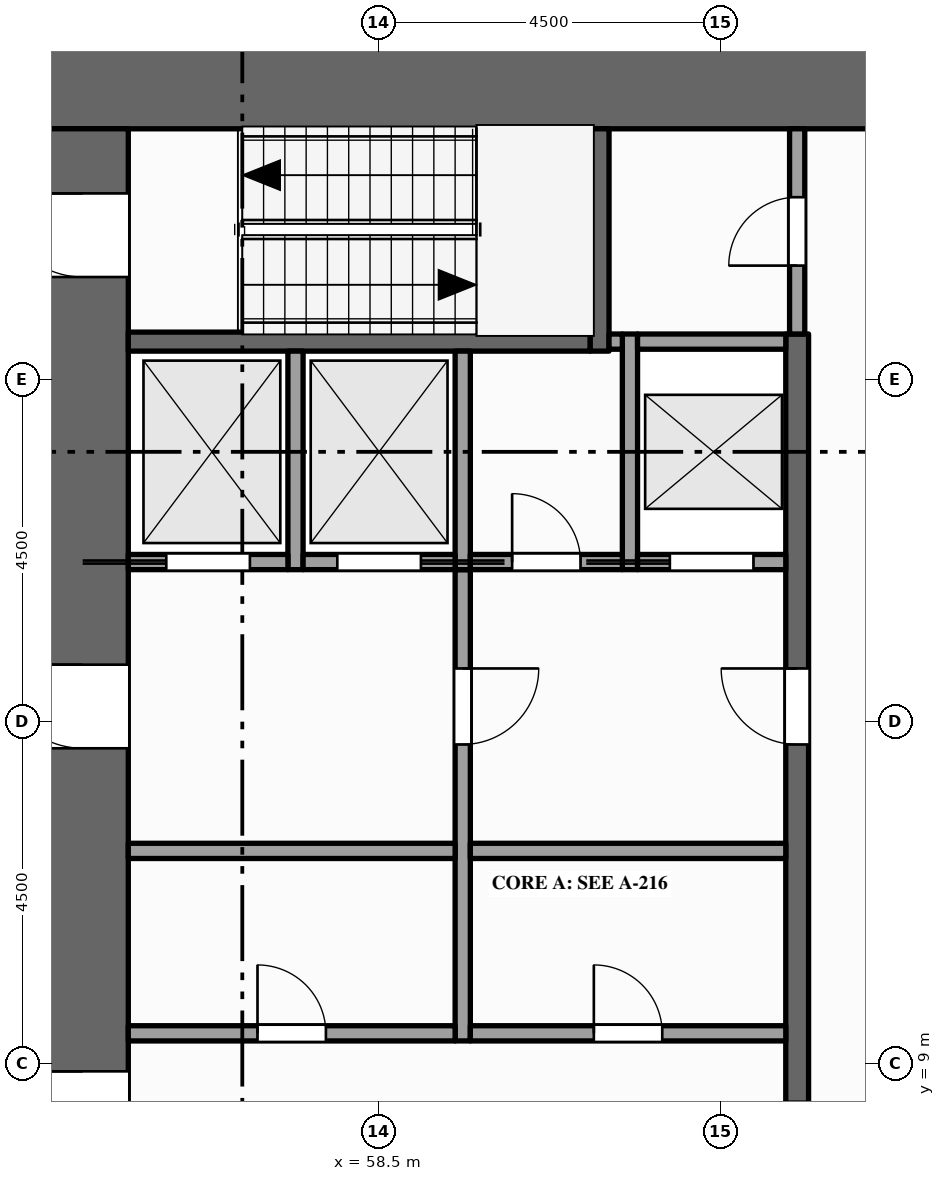
"""IFC4 building model, lengths in metres.
Left out: names, types, materials, properties, quantities, classifications, styles, units other than length and angle.
Written with IfcOpenShell. Run it as: python <this file> out.ifc"""

import sys

from ifc_helpers import new_model, si_unit, direction, frame, frame_2d, origin, place, context, subcontext, project, spatial, rectangle, extrude, element, fill, save


model = new_model("IFC4")
c1 = context("Model", 3, precision=1e-05, world=origin(), true_north=direction((0.0, 1.0)))
c2 = subcontext(c1, "Body", "Model", "MODEL_VIEW")
j1 = project(units=[si_unit("LENGTHUNIT", "METRE"), si_unit("PLANEANGLEUNIT", "RADIAN")], contexts=[c1])
p1 = place(None, origin())
s1 = spatial("IfcSite", under=j1, at=p1, CompositionType="ELEMENT")
p2 = place(p1, origin())
s2 = spatial("IfcBuilding", under=s1, at=p2, CompositionType="ELEMENT")
p3 = place(p2, frame((0.0, 0.0, 83.0)))
s3 = spatial("IfcBuildingStorey", under=s2, at=p3, CompositionType="ELEMENT", Elevation=83.0)
p4 = place(p3, frame((54.0, 21.9, -0.15), z_axis=(0.0, 0.0, 1.0), x_axis=(1.0, 0.0, 0.0)))
e1 = element("IfcWall", 1, at=p4, inside=s3, PredefinedType="SHEAR", context=c2, shape_type="SweptSolid", body=[
    extrude(rectangle(XDim=13.5, YDim=1.2, at=frame_2d((6.75, 0.0))), origin(), (0.0, 0.0, 1.0), 4.0),
])
p5 = place(p3, frame((54.6, 1.2, -0.15), z_axis=(0.0, 0.0, 1.0), x_axis=(0.0, 1.0, 0.0)))
e2 = element("IfcWall", 2, at=p5, inside=s3, PredefinedType="SHEAR", context=c2, shape_type="SweptSolid", body=[
    extrude(rectangle(XDim=20.1, YDim=1.2, at=frame_2d((10.05, 0.0))), origin(), (0.0, 0.0, 1.0), 4.0),
])
p6 = place(p5, frame((5.9, 0.0, 0.15)))
e3 = element("IfcOpeningElement", 3, at=p6, cuts=e2, PredefinedType="OPENING", context=c2, shape_type="SweptSolid", body=[
    extrude(rectangle(XDim=1.8, YDim=2.1, at=frame_2d((0.9, 1.05))), frame((0.0, 0.61, 0.0), z_axis=(0.0, -1.0, 0.0), x_axis=(1.0, 0.0, 0.0)), (0.0, 0.0, 1.0), 1.22),
])
p7 = place(p5, frame((11.95, 0.0, 0.15)))
e4 = element("IfcOpeningElement", 4, at=p7, cuts=e2, PredefinedType="OPENING", context=c2, shape_type="SweptSolid", body=[
    extrude(rectangle(XDim=1.1, YDim=2.1, at=frame_2d((0.55, 1.05))), frame((0.0, 0.61, 0.0), z_axis=(0.0, -1.0, 0.0), x_axis=(1.0, 0.0, 0.0)), (0.0, 0.0, 1.0), 1.22),
])
p8 = place(p5, frame((0.95, 0.0, 0.15)))
e5 = element("IfcOpeningElement", 5, at=p8, cuts=e2, PredefinedType="OPENING", context=c2, shape_type="SweptSolid", body=[
    extrude(rectangle(XDim=1.1, YDim=2.1, at=frame_2d((0.55, 1.05))), frame((0.0, 0.61, 0.0), z_axis=(0.0, -1.0, 0.0), x_axis=(1.0, 0.0, 0.0)), (0.0, 0.0, 1.0), 1.22),
])
p9 = place(p5, frame((18.15, 0.0, 0.15)))
e6 = element("IfcOpeningElement", 6, at=p9, cuts=e2, PredefinedType="OPENING", context=c2, shape_type="SweptSolid", body=[
    extrude(rectangle(XDim=1.1, YDim=2.1, at=frame_2d((0.55, 1.05))), frame((0.0, 0.61, 0.0), z_axis=(0.0, -1.0, 0.0), x_axis=(1.0, 0.0, 0.0)), (0.0, 0.0, 1.0), 1.22),
])
p10 = place(p3, frame((57.4, 15.5, 0.0), z_axis=(0.0, 0.0, 1.0), x_axis=(0.0, 1.0, 0.0)))
e7 = element("IfcWall", 7, at=p10, inside=s3, PredefinedType="SOLIDWALL", context=c2, shape_type="SweptSolid", body=[
    extrude(rectangle(XDim=2.875, YDim=0.2, at=frame_2d((1.438, 0.0))), origin(), (0.0, 0.0, 1.0), 3.85),
])
p11 = place(p3, frame((59.6, 9.3, 0.0), z_axis=(0.0, 0.0, 1.0), x_axis=(0.0, 1.0, 0.0)))
e8 = element("IfcWall", 8, at=p11, inside=s3, PredefinedType="PARTITIONING", context=c2, shape_type="SweptSolid", body=[
    extrude(rectangle(XDim=6.2, YDim=0.2, at=frame_2d((3.1, 0.0))), origin(), (0.0, 0.0, 1.0), 3.85),
])
p12 = place(p11, frame((3.9, 0.0, 0.0)))
e9 = element("IfcOpeningElement", 9, at=p12, cuts=e8, PredefinedType="OPENING", context=c2, shape_type="SweptSolid", body=[
    extrude(rectangle(XDim=1.0, YDim=2.1, at=frame_2d((0.5, 1.05))), frame((0.0, 0.11, 0.0), z_axis=(0.0, -1.0, 0.0), x_axis=(1.0, 0.0, 0.0)), (0.0, 0.0, 1.0), 0.22),
])
p13 = place(p3, frame((59.6, 15.5, 0.0), z_axis=(0.0, 0.0, 1.0), x_axis=(0.0, 1.0, 0.0)))
e10 = element("IfcWall", 10, at=p13, inside=s3, PredefinedType="SOLIDWALL", context=c2, shape_type="SweptSolid", body=[
    extrude(rectangle(XDim=2.875, YDim=0.2, at=frame_2d((1.438, 0.0))), origin(), (0.0, 0.0, 1.0), 3.85),
])
p14 = place(p3, frame((61.4, 18.375, 0.0), z_axis=(0.0, 0.0, 1.0), x_axis=(0.0, 1.0, 0.0)))
e11 = element("IfcWall", 11, at=p14, inside=s3, PredefinedType="SHEAR", context=c2, shape_type="SweptSolid", body=[
    extrude(rectangle(XDim=2.925, YDim=0.25, at=frame_2d((1.462, 0.0))), origin(), (0.0, 0.0, 1.0), 3.85),
])
p15 = place(p3, frame((61.8, 15.5, 0.0), z_axis=(0.0, 0.0, 1.0), x_axis=(0.0, 1.0, 0.0)))
e12 = element("IfcWall", 12, at=p15, inside=s3, PredefinedType="SOLIDWALL", context=c2, shape_type="SweptSolid", body=[
    extrude(rectangle(XDim=3.1, YDim=0.2, at=frame_2d((1.55, 0.0))), origin(), (0.0, 0.0, 1.0), 3.85),
])
p16 = place(p3, frame((64.0, 4.1, 0.0), z_axis=(0.0, 0.0, 1.0), x_axis=(0.0, 1.0, 0.0)))
e13 = element("IfcWall", 13, at=p16, inside=s3, PredefinedType="SHEAR", context=c2, shape_type="SweptSolid", body=[
    extrude(rectangle(XDim=14.5, YDim=0.3, at=frame_2d((7.25, 0.0))), origin(), (0.0, 0.0, 1.0), 3.85),
])
p17 = place(p16, frame((3.4, 0.0, 0.0)))
e14 = element("IfcOpeningElement", 14, at=p17, cuts=e13, PredefinedType="OPENING", context=c2, shape_type="SweptSolid", body=[
    extrude(rectangle(XDim=1.0, YDim=2.1, at=frame_2d((0.5, 1.05))), frame((0.0, 0.16, 0.0), z_axis=(0.0, -1.0, 0.0), x_axis=(1.0, 0.0, 0.0)), (0.0, 0.0, 1.0), 0.32),
])
p18 = place(p16, frame((9.1, 0.0, 0.0)))
e15 = element("IfcOpeningElement", 15, at=p18, cuts=e13, PredefinedType="OPENING", context=c2, shape_type="SweptSolid", body=[
    extrude(rectangle(XDim=1.0, YDim=2.1, at=frame_2d((0.5, 1.05))), frame((0.0, 0.16, 0.0), z_axis=(0.0, -1.0, 0.0), x_axis=(1.0, 0.0, 0.0)), (0.0, 0.0, 1.0), 0.32),
])
p19 = place(p3, frame((64.0, 18.6, 0.0), z_axis=(0.0, 0.0, 1.0), x_axis=(0.0, 1.0, 0.0)))
e16 = element("IfcWall", 16, at=p19, inside=s3, PredefinedType="PARTITIONING", context=c2, shape_type="SweptSolid", body=[
    extrude(rectangle(XDim=2.7, YDim=0.2, at=frame_2d((1.35, 0.0))), origin(), (0.0, 0.0, 1.0), 3.85),
])
p20 = place(p19, frame((0.9, 0.0, 0.0)))
e17 = element("IfcOpeningElement", 17, at=p20, cuts=e16, PredefinedType="OPENING", context=c2, shape_type="SweptSolid", body=[
    extrude(rectangle(XDim=0.9, YDim=2.1, at=frame_2d((0.45, 1.05))), frame((0.0, 0.11, 0.0), z_axis=(0.0, -1.0, 0.0), x_axis=(1.0, 0.0, 0.0)), (0.0, 0.0, 1.0), 0.22),
])
p21 = place(p3, frame((55.2, 9.4, 0.0), z_axis=(0.0, 0.0, 1.0), x_axis=(1.0, 0.0, 0.0)))
e18 = element("IfcWall", 18, at=p21, inside=s3, PredefinedType="PARTITIONING", context=c2, shape_type="SweptSolid", body=[
    extrude(rectangle(XDim=4.3, YDim=0.2, at=frame_2d((2.15, 0.0))), origin(), (0.0, 0.0, 1.0), 3.85),
])
p22 = place(p21, frame((1.7, 0.0, 0.0)))
e19 = element("IfcOpeningElement", 19, at=p22, cuts=e18, PredefinedType="OPENING", context=c2, shape_type="SweptSolid", body=[
    extrude(rectangle(XDim=0.9, YDim=2.1, at=frame_2d((0.45, 1.05))), frame((0.0, 0.11, 0.0), z_axis=(0.0, -1.0, 0.0), x_axis=(1.0, 0.0, 0.0)), (0.0, 0.0, 1.0), 0.22),
])
p23 = place(p3, frame((59.7, 9.4, 0.0), z_axis=(0.0, 0.0, 1.0), x_axis=(1.0, 0.0, 0.0)))
e20 = element("IfcWall", 20, at=p23, inside=s3, PredefinedType="PARTITIONING", context=c2, shape_type="SweptSolid", body=[
    extrude(rectangle(XDim=4.15, YDim=0.2, at=frame_2d((2.075, 0.0))), origin(), (0.0, 0.0, 1.0), 3.85),
])
p24 = place(p23, frame((1.625, 0.0, 0.0)))
e21 = element("IfcOpeningElement", 21, at=p24, cuts=e20, PredefinedType="OPENING", context=c2, shape_type="SweptSolid", body=[
    extrude(rectangle(XDim=0.9, YDim=2.1, at=frame_2d((0.45, 1.05))), frame((0.0, 0.11, 0.0), z_axis=(0.0, -1.0, 0.0), x_axis=(1.0, 0.0, 0.0)), (0.0, 0.0, 1.0), 0.22),
])
p25 = place(p3, frame((55.2, 11.8, 0.0), z_axis=(0.0, 0.0, 1.0), x_axis=(1.0, 0.0, 0.0)))
e22 = element("IfcWall", 22, at=p25, inside=s3, PredefinedType="PARTITIONING", context=c2, shape_type="SweptSolid", body=[
    extrude(rectangle(XDim=4.3, YDim=0.2, at=frame_2d((2.15, 0.0))), origin(), (0.0, 0.0, 1.0), 3.85),
])
p26 = place(p3, frame((59.7, 11.8, 0.0), z_axis=(0.0, 0.0, 1.0), x_axis=(1.0, 0.0, 0.0)))
e23 = element("IfcWall", 23, at=p26, inside=s3, PredefinedType="PARTITIONING", context=c2, shape_type="SweptSolid", body=[
    extrude(rectangle(XDim=4.15, YDim=0.2, at=frame_2d((2.075, 0.0))), origin(), (0.0, 0.0, 1.0), 3.85),
])
p27 = place(p3, frame((55.2, 15.6, 0.0), z_axis=(0.0, 0.0, 1.0), x_axis=(1.0, 0.0, 0.0)))
e24 = element("IfcWall", 24, at=p27, inside=s3, PredefinedType="SOLIDWALL", context=c2, shape_type="SweptSolid", body=[
    extrude(rectangle(XDim=2.1, YDim=0.2, at=frame_2d((1.05, 0.0))), origin(), (0.0, 0.0, 1.0), 3.85),
])
p28 = place(p27, frame((0.5, 0.0, 0.012)))
e25 = element("IfcOpeningElement", 25, at=p28, cuts=e24, PredefinedType="OPENING", context=c2, shape_type="SweptSolid", body=[
    extrude(rectangle(XDim=1.1, YDim=2.1, at=frame_2d((0.55, 1.05))), frame((0.0, 0.11, 0.0), z_axis=(0.0, -1.0, 0.0), x_axis=(1.0, 0.0, 0.0)), (0.0, 0.0, 1.0), 0.22),
])
p29 = place(p3, frame((57.5, 15.6, 0.0), z_axis=(0.0, 0.0, 1.0), x_axis=(1.0, 0.0, 0.0)))
e26 = element("IfcWall", 26, at=p29, inside=s3, PredefinedType="SOLIDWALL", context=c2, shape_type="SweptSolid", body=[
    extrude(rectangle(XDim=2.0, YDim=0.2, at=frame_2d((1.0, 0.0))), origin(), (0.0, 0.0, 1.0), 3.85),
])
p30 = place(p29, frame((0.45, 0.0, 0.012)))
e27 = element("IfcOpeningElement", 27, at=p30, cuts=e26, PredefinedType="OPENING", context=c2, shape_type="SweptSolid", body=[
    extrude(rectangle(XDim=1.1, YDim=2.1, at=frame_2d((0.55, 1.05))), frame((0.0, 0.11, 0.0), z_axis=(0.0, -1.0, 0.0), x_axis=(1.0, 0.0, 0.0)), (0.0, 0.0, 1.0), 0.22),
])
p31 = place(p3, frame((59.7, 15.6, 0.0), z_axis=(0.0, 0.0, 1.0), x_axis=(1.0, 0.0, 0.0)))
e28 = element("IfcWall", 28, at=p31, inside=s3, PredefinedType="PARTITIONING", context=c2, shape_type="SweptSolid", body=[
    extrude(rectangle(XDim=2.0, YDim=0.2, at=frame_2d((1.0, 0.0))), origin(), (0.0, 0.0, 1.0), 3.85),
])
p32 = place(p31, frame((0.55, 0.0, 0.0)))
e29 = element("IfcOpeningElement", 29, at=p32, cuts=e28, PredefinedType="OPENING", context=c2, shape_type="SweptSolid", body=[
    extrude(rectangle(XDim=0.9, YDim=2.1, at=frame_2d((0.45, 1.05))), frame((0.0, 0.11, 0.0), z_axis=(0.0, -1.0, 0.0), x_axis=(1.0, 0.0, 0.0)), (0.0, 0.0, 1.0), 0.22),
])
p33 = place(p3, frame((61.9, 15.6, 0.0), z_axis=(0.0, 0.0, 1.0), x_axis=(1.0, 0.0, 0.0)))
e30 = element("IfcWall", 30, at=p33, inside=s3, PredefinedType="SOLIDWALL", context=c2, shape_type="SweptSolid", body=[
    extrude(rectangle(XDim=1.95, YDim=0.2, at=frame_2d((0.975, 0.0))), origin(), (0.0, 0.0, 1.0), 3.85),
])
p34 = place(p33, frame((0.425, 0.0, 0.012)))
e31 = element("IfcOpeningElement", 31, at=p34, cuts=e30, PredefinedType="OPENING", context=c2, shape_type="SweptSolid", body=[
    extrude(rectangle(XDim=1.1, YDim=2.1, at=frame_2d((0.55, 1.05))), frame((0.0, 0.11, 0.0), z_axis=(0.0, -1.0, 0.0), x_axis=(1.0, 0.0, 0.0)), (0.0, 0.0, 1.0), 0.22),
])
p35 = place(p3, frame((55.2, 18.5, 0.0), z_axis=(0.0, 0.0, 1.0), x_axis=(1.0, 0.0, 0.0)))
e32 = element("IfcWall", 32, at=p35, inside=s3, PredefinedType="SHEAR", context=c2, shape_type="SweptSolid", body=[
    extrude(rectangle(XDim=6.075, YDim=0.25, at=frame_2d((3.038, 0.0))), origin(), (0.0, 0.0, 1.0), 3.85),
])
p36 = place(p3, frame((61.525, 18.5, 0.0), z_axis=(0.0, 0.0, 1.0), x_axis=(1.0, 0.0, 0.0)))
e33 = element("IfcWall", 33, at=p36, inside=s3, PredefinedType="PARTITIONING", context=c2, shape_type="SweptSolid", body=[
    extrude(rectangle(XDim=0.175, YDim=0.2, at=frame_2d((0.087, 0.0))), origin(), (0.0, 0.0, 1.0), 3.85),
])
p37 = place(p3, frame((61.9, 18.5, 0.0), z_axis=(0.0, 0.0, 1.0), x_axis=(1.0, 0.0, 0.0)))
e34 = element("IfcWall", 34, at=p37, inside=s3, PredefinedType="SOLIDWALL", context=c2, shape_type="SweptSolid", body=[
    extrude(rectangle(XDim=1.95, YDim=0.2, at=frame_2d((0.975, 0.0))), origin(), (0.0, 0.0, 1.0), 3.85),
])
p38 = place(p28, origin())
e35 = element("IfcDoor", 35, at=p38, inside=s3, OperationType="SLIDING_TO_LEFT", PredefinedType="DOOR", context=c2, shape_type="SweptSolid", body=[
    extrude(rectangle(XDim=1.1, YDim=2.1, at=frame_2d((0.55, 1.05))), frame((0.0, 0.025, 0.0), z_axis=(0.0, -1.0, 0.0), x_axis=(1.0, 0.0, 0.0)), (0.0, 0.0, 1.0), 0.05),
])
fill(e25, e35)
p39 = place(p30, origin())
e36 = element("IfcDoor", 36, at=p39, inside=s3, OperationType="SLIDING_TO_RIGHT", PredefinedType="DOOR", context=c2, shape_type="SweptSolid", body=[
    extrude(rectangle(XDim=1.1, YDim=2.1, at=frame_2d((0.55, 1.05))), frame((0.0, 0.025, 0.0), z_axis=(0.0, -1.0, 0.0), x_axis=(1.0, 0.0, 0.0)), (0.0, 0.0, 1.0), 0.05),
])
fill(e27, e36)
p40 = place(p34, origin())
e37 = element("IfcDoor", 37, at=p40, inside=s3, OperationType="SLIDING_TO_LEFT", PredefinedType="DOOR", context=c2, shape_type="SweptSolid", body=[
    extrude(rectangle(XDim=1.1, YDim=2.1, at=frame_2d((0.55, 1.05))), frame((0.0, 0.025, 0.0), z_axis=(0.0, -1.0, 0.0), x_axis=(1.0, 0.0, 0.0)), (0.0, 0.0, 1.0), 0.05),
])
fill(e31, e37)
p41 = place(p6, origin())
e38 = element("IfcDoor", 38, at=p41, inside=s3, OperationType="DOUBLE_DOOR_SINGLE_SWING", PredefinedType="DOOR", context=c2, shape_type="SweptSolid", body=[
    extrude(rectangle(XDim=1.8, YDim=2.1, at=frame_2d((0.9, 1.05))), frame((0.0, 0.025, 0.0), z_axis=(0.0, -1.0, 0.0), x_axis=(1.0, 0.0, 0.0)), (0.0, 0.0, 1.0), 0.05),
])
fill(e3, e38)
p42 = place(p7, origin())
e39 = element("IfcDoor", 39, at=p42, inside=s3, OperationType="SINGLE_SWING_RIGHT", PredefinedType="DOOR", context=c2, shape_type="SweptSolid", body=[
    extrude(rectangle(XDim=1.1, YDim=2.1, at=frame_2d((0.55, 1.05))), frame((0.0, 0.025, 0.0), z_axis=(0.0, -1.0, 0.0), x_axis=(1.0, 0.0, 0.0)), (0.0, 0.0, 1.0), 0.05),
])
fill(e4, e39)
p43 = place(p12, origin())
e40 = element("IfcDoor", 40, at=p43, inside=s3, OperationType="SINGLE_SWING_RIGHT", PredefinedType="DOOR", context=c2, shape_type="SweptSolid", body=[
    extrude(rectangle(XDim=1.0, YDim=2.1, at=frame_2d((0.5, 1.05))), frame((0.0, 0.025, 0.0), z_axis=(0.0, -1.0, 0.0), x_axis=(1.0, 0.0, 0.0)), (0.0, 0.0, 1.0), 0.05),
])
fill(e9, e40)
p44 = place(p18, origin())
e41 = element("IfcDoor", 41, at=p44, inside=s3, OperationType="SINGLE_SWING_RIGHT", PredefinedType="DOOR", context=c2, shape_type="SweptSolid", body=[
    extrude(rectangle(XDim=1.0, YDim=2.1, at=frame_2d((0.5, 1.05))), frame((0.0, 0.025, 0.0), z_axis=(0.0, -1.0, 0.0), x_axis=(1.0, 0.0, 0.0)), (0.0, 0.0, 1.0), 0.05),
])
fill(e15, e41)
p45 = place(p9, origin())
e42 = element("IfcDoor", 42, at=p45, inside=s3, OperationType="SINGLE_SWING_RIGHT", PredefinedType="DOOR", context=c2, shape_type="SweptSolid", body=[
    extrude(rectangle(XDim=1.1, YDim=2.1, at=frame_2d((0.55, 1.05))), frame((0.0, 0.025, 0.0), z_axis=(0.0, -1.0, 0.0), x_axis=(1.0, 0.0, 0.0)), (0.0, 0.0, 1.0), 0.05),
])
fill(e6, e42)
p46 = place(p20, origin())
e43 = element("IfcDoor", 43, at=p46, inside=s3, OperationType="SINGLE_SWING_LEFT", PredefinedType="DOOR", context=c2, shape_type="SweptSolid", body=[
    extrude(rectangle(XDim=0.9, YDim=2.1, at=frame_2d((0.45, 1.05))), frame((0.0, 0.025, 0.0), z_axis=(0.0, -1.0, 0.0), x_axis=(1.0, 0.0, 0.0)), (0.0, 0.0, 1.0), 0.05),
])
fill(e17, e43)
p47 = place(p22, origin())
e44 = element("IfcDoor", 44, at=p47, inside=s3, OperationType="SINGLE_SWING_LEFT", PredefinedType="DOOR", context=c2, shape_type="SweptSolid", body=[
    extrude(rectangle(XDim=0.9, YDim=2.1, at=frame_2d((0.45, 1.05))), frame((0.0, 0.025, 0.0), z_axis=(0.0, -1.0, 0.0), x_axis=(1.0, 0.0, 0.0)), (0.0, 0.0, 1.0), 0.05),
])
fill(e19, e44)
p48 = place(p24, origin())
e45 = element("IfcDoor", 45, at=p48, inside=s3, OperationType="SINGLE_SWING_LEFT", PredefinedType="DOOR", context=c2, shape_type="SweptSolid", body=[
    extrude(rectangle(XDim=0.9, YDim=2.1, at=frame_2d((0.45, 1.05))), frame((0.0, 0.025, 0.0), z_axis=(0.0, -1.0, 0.0), x_axis=(1.0, 0.0, 0.0)), (0.0, 0.0, 1.0), 0.05),
])
fill(e21, e45)
p49 = place(p32, origin())
e46 = element("IfcDoor", 46, at=p49, inside=s3, OperationType="SINGLE_SWING_LEFT", PredefinedType="DOOR", context=c2, shape_type="SweptSolid", body=[
    extrude(rectangle(XDim=0.9, YDim=2.1, at=frame_2d((0.45, 1.05))), frame((0.0, 0.025, 0.0), z_axis=(0.0, -1.0, 0.0), x_axis=(1.0, 0.0, 0.0)), (0.0, 0.0, 1.0), 0.05),
])
fill(e29, e46)
save(model, sys.argv[1])
